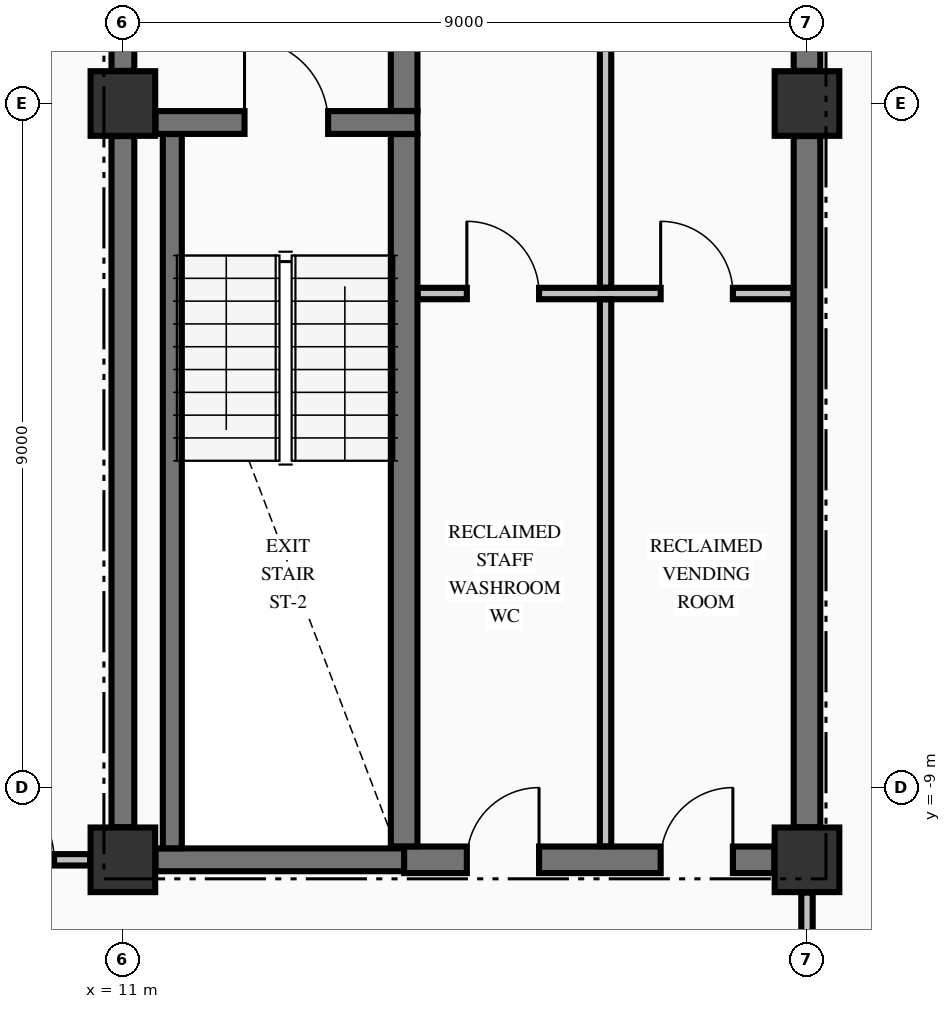
"""IFC4 building model, lengths in metres.
Left out: names, types, materials, properties, quantities, classifications, styles, units other than length and angle.
Written with IfcOpenShell. Run it as: python <this file> out.ifc"""

import sys

from ifc_helpers import new_model, si_unit, direction, frame, frame_2d, origin, origin_2d, place, context, subcontext, project, spatial, rectangle, extrude, element, fill, save


model = new_model("IFC4")
c1 = context("Model", 3, precision=1e-05, world=origin(), true_north=direction((0.0, 1.0)))
c2 = subcontext(c1, "Body", "Model", "MODEL_VIEW")
j1 = project(units=[si_unit("LENGTHUNIT", "METRE"), si_unit("PLANEANGLEUNIT", "RADIAN")], contexts=[c1])
p1 = place(None, origin())
s1 = spatial("IfcSite", under=j1, at=p1, CompositionType="ELEMENT")
p2 = place(p1, origin())
s2 = spatial("IfcBuilding", under=s1, at=p2, CompositionType="ELEMENT")
p3 = place(p2, frame((0.0, 0.0, 201.66)))
s3 = spatial("IfcBuildingStorey", under=s2, at=p3, CompositionType="ELEMENT", Elevation=201.66)
for number, where, z_axis, x_axis in (
    (1, (11.0, -9.95, -0.25), (0.0, 0.0, 1.0), (1.0, 0.0, 0.0)),
    (2, (11.0, 0.0, -0.25), (0.0, 0.0, 1.0), (1.0, 0.0, 0.0)),
    (3, (20.0, -9.95, -0.25), (0.0, 0.0, 1.0), (1.0, 0.0, 0.0)),
    (4, (20.0, 0.0, -0.25), (0.0, 0.0, 1.0), (1.0, 0.0, 0.0)),
):
    element("IfcColumn", number, at=place(p3, frame(where, z_axis=z_axis, x_axis=x_axis)), inside=s3, PredefinedType="COLUMN", context=c2, shape_type="SweptSolid", body=[
        extrude(rectangle(XDim=0.85, YDim=0.85, at=origin_2d()), origin(), (0.0, 0.0, 1.0), 3.4),
    ])
p4 = place(p3, frame((11.429, -9.95, 0.0), z_axis=(0.0, 0.0, 1.0), x_axis=(1.0, 0.0, 0.0)))
e5 = element("IfcWall", 5, at=p4, inside=s3, PredefinedType="SHEAR", context=c2, shape_type="SweptSolid", body=[
    extrude(rectangle(XDim=3.271, YDim=0.3, at=frame_2d((1.635, 0.0))), origin(), (0.0, 0.0, 1.0), 3.15),
])
p5 = place(p3, frame((14.7, -9.95, 0.0), z_axis=(0.0, 0.0, 1.0), x_axis=(1.0, 0.0, 0.0)))
e6 = element("IfcWall", 6, at=p5, inside=s3, PredefinedType="SHEAR", context=c2, shape_type="SweptSolid", body=[
    extrude(rectangle(XDim=4.871, YDim=0.35, at=frame_2d((2.436, 0.0))), origin(), (0.0, 0.0, 1.0), 3.15),
])
p6 = place(p5, frame((0.825, 0.0, 0.0)))
e7 = element("IfcOpeningElement", 7, at=p6, cuts=e6, PredefinedType="OPENING", context=c2, shape_type="SweptSolid", body=[
    extrude(rectangle(XDim=0.95, YDim=2.15, at=frame_2d((0.475, 1.075))), frame((0.0, 0.185, 0.0), z_axis=(0.0, -1.0, 0.0), x_axis=(1.0, 0.0, 0.0)), (0.0, 0.0, 1.0), 0.37),
])
p7 = place(p5, frame((3.375, 0.0, 0.0)))
e8 = element("IfcOpeningElement", 8, at=p7, cuts=e6, PredefinedType="OPENING", context=c2, shape_type="SweptSolid", body=[
    extrude(rectangle(XDim=0.95, YDim=2.15, at=frame_2d((0.475, 1.075))), frame((0.0, 0.185, 0.0), z_axis=(0.0, -1.0, 0.0), x_axis=(1.0, 0.0, 0.0)), (0.0, 0.0, 1.0), 0.37),
])
p8 = place(p3, frame((11.429, -0.25, 0.0), z_axis=(0.0, 0.0, 1.0), x_axis=(1.0, 0.0, 0.0)))
e9 = element("IfcWall", 9, at=p8, inside=s3, PredefinedType="SHEAR", context=c2, shape_type="SweptSolid", body=[
    extrude(rectangle(XDim=3.446, YDim=0.3, at=frame_2d((1.723, 0.0))), origin(), (0.0, 0.0, 1.0), 3.15),
])
p9 = place(p8, frame((1.171, 0.0, 0.0)))
e10 = element("IfcOpeningElement", 10, at=p9, cuts=e9, PredefinedType="OPENING", context=c2, shape_type="SweptSolid", body=[
    extrude(rectangle(XDim=1.1, YDim=2.15, at=frame_2d((0.55, 1.075))), frame((0.0, 0.16, 0.0), z_axis=(0.0, -1.0, 0.0), x_axis=(1.0, 0.0, 0.0)), (0.0, 0.0, 1.0), 0.32),
])
p10 = place(p3, frame((-10.569, -9.95, 0.0), z_axis=(0.0, 0.0, 1.0), x_axis=(1.0, 0.0, 0.0)))
e11 = element("IfcWall", 11, at=p10, inside=s3, PredefinedType="PARTITIONING", context=c2, shape_type="SweptSolid", body=[
    extrude(rectangle(XDim=21.138, YDim=0.15, at=frame_2d((10.569, 0.0))), origin(), (0.0, 0.0, 1.0), 3.15),
])
p11 = place(p10, frame((0.474, 0.0, 0.0)))
e12 = element("IfcOpeningElement", 12, at=p11, cuts=e11, PredefinedType="OPENING", context=c2, shape_type="SweptSolid", body=[
    extrude(rectangle(XDim=1.05, YDim=2.15, at=frame_2d((0.525, 1.075))), frame((0.0, 0.085, 0.0), z_axis=(0.0, -1.0, 0.0), x_axis=(1.0, 0.0, 0.0)), (0.0, 0.0, 1.0), 0.17),
])
p12 = place(p10, frame((19.614, 0.0, 0.0)))
e13 = element("IfcOpeningElement", 13, at=p12, cuts=e11, PredefinedType="OPENING", context=c2, shape_type="SweptSolid", body=[
    extrude(rectangle(XDim=1.05, YDim=2.15, at=frame_2d((0.525, 1.075))), frame((0.0, 0.085, 0.0), z_axis=(0.0, -1.0, 0.0), x_axis=(1.0, 0.0, 0.0)), (0.0, 0.0, 1.0), 0.17),
])
p13 = place(p10, frame((13.574, 0.0, 0.0)))
e14 = element("IfcOpeningElement", 14, at=p13, cuts=e11, PredefinedType="OPENING", context=c2, shape_type="SweptSolid", body=[
    extrude(rectangle(XDim=0.95, YDim=2.15, at=frame_2d((0.475, 1.075))), frame((0.0, 0.085, 0.0), z_axis=(0.0, -1.0, 0.0), x_axis=(1.0, 0.0, 0.0)), (0.0, 0.0, 1.0), 0.17),
])
p14 = place(p3, frame((14.878, -2.5, 0.0), z_axis=(0.0, 0.0, 1.0), x_axis=(1.0, 0.0, 0.0)))
e15 = element("IfcWall", 15, at=p14, inside=s3, PredefinedType="PARTITIONING", context=c2, shape_type="SweptSolid", body=[
    extrude(rectangle(XDim=4.944, YDim=0.15, at=frame_2d((2.472, 0.0))), origin(), (0.0, 0.0, 1.0), 3.15),
])
p15 = place(p14, frame((0.647, 0.0, 0.0)))
e16 = element("IfcOpeningElement", 16, at=p15, cuts=e15, PredefinedType="OPENING", context=c2, shape_type="SweptSolid", body=[
    extrude(rectangle(XDim=0.95, YDim=2.15, at=frame_2d((0.475, 1.075))), frame((0.0, 0.085, 0.0), z_axis=(0.0, -1.0, 0.0), x_axis=(1.0, 0.0, 0.0)), (0.0, 0.0, 1.0), 0.17),
])
p16 = place(p14, frame((3.197, 0.0, 0.0)))
e17 = element("IfcOpeningElement", 17, at=p16, cuts=e15, PredefinedType="OPENING", context=c2, shape_type="SweptSolid", body=[
    extrude(rectangle(XDim=0.95, YDim=2.15, at=frame_2d((0.475, 1.075))), frame((0.0, 0.085, 0.0), z_axis=(0.0, -1.0, 0.0), x_axis=(1.0, 0.0, 0.0)), (0.0, 0.0, 1.0), 0.17),
])
p17 = place(p3, frame((11.0, -9.521, 0.0), z_axis=(0.0, 0.0, 1.0), x_axis=(0.0, 1.0, 0.0)))
e18 = element("IfcWall", 18, at=p17, inside=s3, PredefinedType="SHEAR", context=c2, shape_type="SweptSolid", body=[
    extrude(rectangle(XDim=9.092, YDim=0.3, at=frame_2d((4.546, 0.0))), origin(), (0.0, 0.0, 1.0), 3.15),
])
p18 = place(p3, frame((11.0, 0.429, 0.0), z_axis=(0.0, 0.0, 1.0), x_axis=(0.0, 1.0, 0.0)))
e19 = element("IfcWall", 19, at=p18, inside=s3, PredefinedType="SHEAR", context=c2, shape_type="SweptSolid", body=[
    extrude(rectangle(XDim=2.319, YDim=0.3, at=frame_2d((1.16, 0.0))), origin(), (0.0, 0.0, 1.0), 3.15),
])
p19 = place(p18, frame((0.671, 0.0, 0.0)))
e20 = element("IfcOpeningElement", 20, at=p19, cuts=e19, PredefinedType="OPENING", context=c2, shape_type="SweptSolid", body=[
    extrude(rectangle(XDim=1.1, YDim=2.15, at=frame_2d((0.55, 1.075))), frame((0.0, 0.16, 0.0), z_axis=(0.0, -1.0, 0.0), x_axis=(1.0, 0.0, 0.0)), (0.0, 0.0, 1.0), 0.32),
])
p20 = place(p3, frame((11.65, -9.798, 0.0), z_axis=(0.0, 0.0, 1.0), x_axis=(0.0, 1.0, 0.0)))
e21 = element("IfcWall", 21, at=p20, inside=s3, PredefinedType="SOLIDWALL", context=c2, shape_type="SweptSolid", body=[
    extrude(rectangle(XDim=9.396, YDim=0.25, at=frame_2d((4.698, 0.0))), origin(), (0.0, 0.0, 1.0), 3.15),
])
p21 = place(p3, frame((14.7, -9.773, 0.0), z_axis=(0.0, 0.0, 1.0), x_axis=(0.0, 1.0, 0.0)))
e22 = element("IfcWall", 22, at=p21, inside=s3, PredefinedType="SHEAR", context=c2, shape_type="SweptSolid", body=[
    extrude(rectangle(XDim=9.371, YDim=0.35, at=frame_2d((4.686, 0.0))), origin(), (0.0, 0.0, 1.0), 3.15),
])
p22 = place(p3, frame((14.7, -0.098, 0.0), z_axis=(0.0, 0.0, 1.0), x_axis=(0.0, 1.0, 0.0)))
e23 = element("IfcWall", 23, at=p22, inside=s3, PredefinedType="SHEAR", context=c2, shape_type="SweptSolid", body=[
    extrude(rectangle(XDim=2.846, YDim=0.35, at=frame_2d((1.423, 0.0))), origin(), (0.0, 0.0, 1.0), 3.15),
])
p23 = place(p3, frame((20.0, -9.521, 0.0), z_axis=(0.0, 0.0, 1.0), x_axis=(0.0, 1.0, 0.0)))
e24 = element("IfcWall", 24, at=p23, inside=s3, PredefinedType="SHEAR", context=c2, shape_type="SweptSolid", body=[
    extrude(rectangle(XDim=9.092, YDim=0.35, at=frame_2d((4.546, 0.0))), origin(), (0.0, 0.0, 1.0), 3.15),
])
p24 = place(p3, frame((20.0, 0.429, 0.0), z_axis=(0.0, 0.0, 1.0), x_axis=(0.0, 1.0, 0.0)))
e25 = element("IfcWall", 25, at=p24, inside=s3, PredefinedType="SHEAR", context=c2, shape_type="SweptSolid", body=[
    extrude(rectangle(XDim=4.744, YDim=0.35, at=frame_2d((2.372, 0.0))), origin(), (0.0, 0.0, 1.0), 3.15),
])
p25 = place(p3, frame((17.35, -9.772, 0.0), z_axis=(0.0, 0.0, 1.0), x_axis=(0.0, 1.0, 0.0)))
e26 = element("IfcWall", 26, at=p25, inside=s3, PredefinedType="PARTITIONING", context=c2, shape_type="SweptSolid", body=[
    extrude(rectangle(XDim=7.194, YDim=0.15, at=frame_2d((3.597, 0.0))), origin(), (0.0, 0.0, 1.0), 3.15),
])
p26 = place(p3, frame((17.35, -2.422, 0.0), z_axis=(0.0, 0.0, 1.0), x_axis=(0.0, 1.0, 0.0)))
e27 = element("IfcWall", 27, at=p26, inside=s3, PredefinedType="PARTITIONING", context=c2, shape_type="SweptSolid", body=[
    extrude(rectangle(XDim=7.144, YDim=0.15, at=frame_2d((3.572, 0.0))), origin(), (0.0, 0.0, 1.0), 3.15),
])
p27 = place(p3, frame((20.0, -13.022, 0.0), z_axis=(0.0, 0.0, 1.0), x_axis=(0.0, 1.0, 0.0)))
e28 = element("IfcWall", 28, at=p27, inside=s3, PredefinedType="PARTITIONING", context=c2, shape_type="SweptSolid", body=[
    extrude(rectangle(XDim=2.641, YDim=0.15, at=frame_2d((1.32, 0.0))), origin(), (0.0, 0.0, 1.0), 2.342),
])
p28 = place(p9, origin())
e29 = element("IfcDoor", 29, at=p28, inside=s3, OperationType="SINGLE_SWING_LEFT", PredefinedType="DOOR", context=c2, shape_type="SweptSolid", body=[
    extrude(rectangle(XDim=1.1, YDim=2.15, at=frame_2d((0.55, 1.075))), frame((0.0, 0.025, 0.0), z_axis=(0.0, -1.0, 0.0), x_axis=(1.0, 0.0, 0.0)), (0.0, 0.0, 1.0), 0.05),
])
fill(e10, e29)
p29 = place(p6, origin())
e30 = element("IfcDoor", 30, at=p29, inside=s3, OperationType="SINGLE_SWING_RIGHT", PredefinedType="DOOR", context=c2, shape_type="SweptSolid", body=[
    extrude(rectangle(XDim=0.95, YDim=2.15, at=frame_2d((0.475, 1.075))), frame((0.0, 0.025, 0.0), z_axis=(0.0, -1.0, 0.0), x_axis=(1.0, 0.0, 0.0)), (0.0, 0.0, 1.0), 0.05),
])
fill(e7, e30)
p30 = place(p15, origin())
e31 = element("IfcDoor", 31, at=p30, inside=s3, OperationType="SINGLE_SWING_LEFT", PredefinedType="DOOR", context=c2, shape_type="SweptSolid", body=[
    extrude(rectangle(XDim=0.95, YDim=2.15, at=frame_2d((0.475, 1.075))), frame((0.0, 0.025, 0.0), z_axis=(0.0, -1.0, 0.0), x_axis=(1.0, 0.0, 0.0)), (0.0, 0.0, 1.0), 0.05),
])
fill(e16, e31)
p31 = place(p7, origin())
e32 = element("IfcDoor", 32, at=p31, inside=s3, OperationType="SINGLE_SWING_RIGHT", PredefinedType="DOOR", context=c2, shape_type="SweptSolid", body=[
    extrude(rectangle(XDim=0.95, YDim=2.15, at=frame_2d((0.475, 1.075))), frame((0.0, 0.025, 0.0), z_axis=(0.0, -1.0, 0.0), x_axis=(1.0, 0.0, 0.0)), (0.0, 0.0, 1.0), 0.05),
])
fill(e8, e32)
p32 = place(p16, origin())
e33 = element("IfcDoor", 33, at=p32, inside=s3, OperationType="SINGLE_SWING_LEFT", PredefinedType="DOOR", context=c2, shape_type="SweptSolid", body=[
    extrude(rectangle(XDim=0.95, YDim=2.15, at=frame_2d((0.475, 1.075))), frame((0.0, 0.025, 0.0), z_axis=(0.0, -1.0, 0.0), x_axis=(1.0, 0.0, 0.0)), (0.0, 0.0, 1.0), 0.05),
])
fill(e17, e33)
p33 = place(p12, origin())
e34 = element("IfcDoor", 34, at=p33, inside=s3, OperationType="SINGLE_SWING_LEFT", PredefinedType="DOOR", context=c2, shape_type="SweptSolid", body=[
    extrude(rectangle(XDim=1.05, YDim=2.15, at=frame_2d((0.525, 1.075))), frame((0.0, 0.025, 0.0), z_axis=(0.0, -1.0, 0.0), x_axis=(1.0, 0.0, 0.0)), (0.0, 0.0, 1.0), 0.05),
])
fill(e13, e34)
save(model, sys.argv[1])
